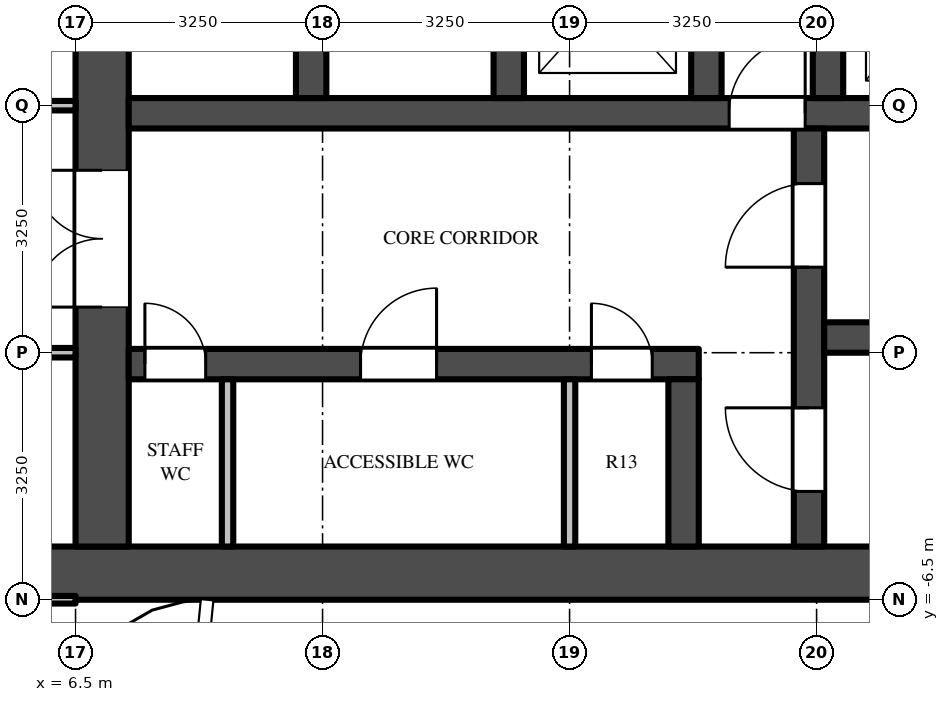
"""IFC4 building model, lengths in metres.
Left out: names, types, materials, properties, quantities, classifications, styles, units other than length and angle.
Written with IfcOpenShell. Run it as: python <this file> out.ifc"""

import sys

from ifc_helpers import new_model, si_unit, direction, frame, frame_2d, origin, place, context, subcontext, project, spatial, rectangle, extrude, source, transform, mapped, element, fill, save


model = new_model("IFC4")
c1 = context("Model", 3, precision=1e-05, world=origin(), true_north=direction((0.0, 1.0)))
c2 = subcontext(c1, "Body", "Model", "MODEL_VIEW")
j1 = project(units=[si_unit("LENGTHUNIT", "METRE"), si_unit("PLANEANGLEUNIT", "RADIAN")], contexts=[c1])
p1 = place(None, origin())
s1 = spatial("IfcSite", under=j1, at=p1, CompositionType="ELEMENT")
p2 = place(p1, origin())
s2 = spatial("IfcBuilding", under=s1, at=p2, CompositionType="ELEMENT")
p3 = place(p2, frame((0.0, 0.0, 255.8)))
s3 = spatial("IfcBuildingStorey", under=s2, at=p3, CompositionType="ELEMENT", Elevation=255.8)
m1 = source(origin(), c2, "Body", "SweptSolid", [
    extrude(rectangle(XDim=16.6, YDim=0.7, at=frame_2d((8.3, 0.0))), origin(), (0.0, 0.0, 1.0), 3.7),
])
p4 = place(p3, frame((6.15, -6.15, 0.0), z_axis=(0.0, 0.0, 1.0), x_axis=(1.0, 0.0, 0.0)))
e1 = element("IfcWall", 1, at=p4, inside=s3, PredefinedType="SHEAR", context=c2, shape_type="MappedRepresentation", body=[
    mapped(m1, transform((0.0, 0.0, 0.0))),
])
m2 = source(origin(), c2, "Body", "SweptSolid", [
    extrude(rectangle(XDim=9.05, YDim=0.7, at=frame_2d((4.525, 0.0))), origin(), (0.0, 0.0, 1.0), 3.7),
])
p5 = place(p3, frame((6.85, -5.8, 0.0), z_axis=(0.0, 0.0, 1.0), x_axis=(0.0, 1.0, 0.0)))
e2 = element("IfcWall", 2, at=p5, inside=s3, PredefinedType="SHEAR", context=c2, shape_type="MappedRepresentation", body=[
    mapped(m2, transform((0.0, 0.0, 0.0))),
])
m3 = source(origin(), c2, "Body", "SweptSolid", [
    extrude(rectangle(XDim=1.8, YDim=2.1, at=frame_2d((0.9, 1.05))), frame((0.0, 0.36, 0.0), z_axis=(0.0, -1.0, 0.0), x_axis=(1.0, 0.0, 0.0)), (0.0, 0.0, 1.0), 0.72),
])
p6 = place(p5, frame((3.15, 0.0, 0.0)))
e3 = element("IfcOpeningElement", 3, at=p6, cuts=e2, PredefinedType="OPENING", context=c2, shape_type="MappedRepresentation", body=[
    mapped(m3, transform((0.0, 0.0, 0.0))),
])
m4 = source(origin(), c2, "Body", "SweptSolid", [
    extrude(rectangle(XDim=7.5, YDim=0.4, at=frame_2d((3.75, 0.0))), origin(), (0.0, 0.0, 1.0), 3.7),
])
p7 = place(p3, frame((7.2, -3.4, 0.0), z_axis=(0.0, 0.0, 1.0), x_axis=(1.0, 0.0, 0.0)))
e4 = element("IfcWall", 4, at=p7, inside=s3, PredefinedType="SHEAR", context=c2, shape_type="MappedRepresentation", body=[
    mapped(m4, transform((0.0, 0.0, 0.0))),
])
m5 = source(origin(), c2, "Body", "SweptSolid", [
    extrude(rectangle(XDim=0.8, YDim=2.1, at=frame_2d((0.4, 1.05))), frame((0.0, 0.21, 0.0), z_axis=(0.0, -1.0, 0.0), x_axis=(1.0, 0.0, 0.0)), (0.0, 0.0, 1.0), 0.42),
])
p8 = place(p7, frame((0.212, 0.0, 0.0)))
e5 = element("IfcOpeningElement", 5, at=p8, cuts=e4, PredefinedType="OPENING", context=c2, shape_type="MappedRepresentation", body=[
    mapped(m5, transform((0.0, 0.0, 0.0))),
])
m6 = source(origin(), c2, "Body", "SweptSolid", [
    extrude(rectangle(XDim=1.0, YDim=2.1, at=frame_2d((0.5, 1.05))), frame((0.0, 0.21, 0.0), z_axis=(0.0, -1.0, 0.0), x_axis=(1.0, 0.0, 0.0)), (0.0, 0.0, 1.0), 0.42),
])
p9 = place(p7, frame((3.05, 0.0, 0.0)))
e6 = element("IfcOpeningElement", 6, at=p9, cuts=e4, PredefinedType="OPENING", context=c2, shape_type="MappedRepresentation", body=[
    mapped(m6, transform((0.0, 0.0, 0.0))),
])
p10 = place(p7, frame((6.087, 0.0, 0.0)))
e7 = element("IfcOpeningElement", 7, at=p10, cuts=e4, PredefinedType="OPENING", context=c2, shape_type="MappedRepresentation", body=[
    mapped(m5, transform((0.0, 0.0, 0.0))),
])
m7 = source(origin(), c2, "Body", "SweptSolid", [
    extrude(rectangle(XDim=14.85, YDim=0.4, at=frame_2d((7.425, 0.0))), origin(), (0.0, 0.0, 1.0), 3.7),
])
p11 = place(p3, frame((7.2, -0.1, 0.0), z_axis=(0.0, 0.0, 1.0), x_axis=(1.0, 0.0, 0.0)))
e8 = element("IfcWall", 8, at=p11, inside=s3, PredefinedType="SHEAR", context=c2, shape_type="MappedRepresentation", body=[
    mapped(m7, transform((0.0, 0.0, 0.0))),
])
p12 = place(p11, frame((7.9, 0.0, 0.0)))
e9 = element("IfcOpeningElement", 9, at=p12, cuts=e8, PredefinedType="OPENING", context=c2, shape_type="MappedRepresentation", body=[
    mapped(m6, transform((0.0, 0.0, 0.0))),
])
m8 = source(origin(), c2, "Body", "SweptSolid", [
    extrude(rectangle(XDim=5.5, YDim=0.4, at=frame_2d((2.75, 0.0))), origin(), (0.0, 0.0, 1.0), 3.7),
])
p13 = place(p3, frame((16.15, -5.8, 0.0), z_axis=(0.0, 0.0, 1.0), x_axis=(0.0, 1.0, 0.0)))
e10 = element("IfcWall", 10, at=p13, inside=s3, PredefinedType="SHEAR", context=c2, shape_type="MappedRepresentation", body=[
    mapped(m8, transform((0.0, 0.0, 0.0))),
])
m9 = source(origin(), c2, "Body", "SweptSolid", [
    extrude(rectangle(XDim=1.1, YDim=2.1, at=frame_2d((0.55, 1.05))), frame((0.0, 0.21, 0.0), z_axis=(0.0, -1.0, 0.0), x_axis=(1.0, 0.0, 0.0)), (0.0, 0.0, 1.0), 0.42),
])
p14 = place(p13, frame((0.725, 0.0, 0.0)))
e11 = element("IfcOpeningElement", 11, at=p14, cuts=e10, PredefinedType="OPENING", context=c2, shape_type="MappedRepresentation", body=[
    mapped(m9, transform((0.0, 0.0, 0.0))),
])
p15 = place(p13, frame((3.675, 0.0, 0.0)))
e12 = element("IfcOpeningElement", 12, at=p15, cuts=e10, PredefinedType="OPENING", context=c2, shape_type="MappedRepresentation", body=[
    mapped(m9, transform((0.0, 0.0, 0.0))),
])
m10 = source(origin(), c2, "Body", "SweptSolid", [
    extrude(rectangle(XDim=5.7, YDim=0.4, at=frame_2d((2.85, 0.0))), origin(), (0.0, 0.0, 1.0), 3.7),
])
p16 = place(p3, frame((16.35, -3.05, 0.0), z_axis=(0.0, 0.0, 1.0), x_axis=(1.0, 0.0, 0.0)))
e13 = element("IfcWall", 13, at=p16, inside=s3, PredefinedType="SHEAR", context=c2, shape_type="MappedRepresentation", body=[
    mapped(m10, transform((0.0, 0.0, 0.0))),
])
m11 = source(origin(), c2, "Body", "SweptSolid", [
    extrude(rectangle(XDim=2.2, YDim=0.4, at=frame_2d((1.1, 0.0))), origin(), (0.0, 0.0, 1.0), 3.7),
])
p17 = place(p3, frame((14.5, -5.8, 0.0), z_axis=(0.0, 0.0, 1.0), x_axis=(0.0, 1.0, 0.0)))
e14 = element("IfcWall", 14, at=p17, inside=s3, PredefinedType="SHEAR", context=c2, shape_type="MappedRepresentation", body=[
    mapped(m11, transform((0.0, 0.0, 0.0))),
])
m12 = source(origin(), c2, "Body", "SweptSolid", [
    extrude(rectangle(XDim=2.45, YDim=0.4, at=frame_2d((1.225, 0.0))), origin(), (0.0, 0.0, 1.0), 3.7),
])
for number, where, z_axis, x_axis in (
    (15, (9.6, 0.1, 0.0), (0.0, 0.0, 1.0), (0.0, 1.0, 0.0)),
    (16, (12.2, 0.1, 0.0), (0.0, 0.0, 1.0), (0.0, 1.0, 0.0)),
    (17, (14.8, 0.1, 0.0), (0.0, 0.0, 1.0), (0.0, 1.0, 0.0)),
    (18, (16.4, 0.1, 0.0), (0.0, 0.0, 1.0), (0.0, 1.0, 0.0)),
):
    element("IfcWall", number, at=place(p3, frame(where, z_axis=z_axis, x_axis=x_axis)), inside=s3, PredefinedType="SHEAR", context=c2, shape_type="MappedRepresentation", body=[
        mapped(m12, transform((0.0, 0.0, 0.0))),
    ])
m13 = source(origin(), c2, "Body", "SweptSolid", [
    extrude(rectangle(XDim=2.2, YDim=0.15, at=frame_2d((1.1, 0.0))), origin(), (0.0, 0.0, 1.0), 3.7),
])
for number, where, z_axis, x_axis in (
    (19, (8.5, -5.8, 0.0), (0.0, 0.0, 1.0), (0.0, 1.0, 0.0)),
    (20, (13.0, -5.8, 0.0), (0.0, 0.0, 1.0), (0.0, 1.0, 0.0)),
):
    element("IfcWall", number, at=place(p3, frame(where, z_axis=z_axis, x_axis=x_axis)), inside=s3, PredefinedType="PARTITIONING", context=c2, shape_type="MappedRepresentation", body=[
        mapped(m13, transform((0.0, 0.0, 0.0))),
    ])
m14 = source(origin(), c2, "Body", "SweptSolid", [
    extrude(rectangle(XDim=5.363, YDim=0.1, at=frame_2d((2.681, 0.0))), origin(), (0.0, 0.0, 1.0), 2.78),
])
p18 = place(p3, frame((1.137, -6.5, 0.0), z_axis=(0.0, 0.0, 1.0), x_axis=(1.0, 0.0, 0.0)))
e21 = element("IfcWall", 21, at=p18, inside=s3, PredefinedType="PARTITIONING", context=c2, shape_type="MappedRepresentation", body=[
    mapped(m14, transform((0.0, 0.0, 0.0))),
])
m15 = source(origin(), c2, "Body", "SweptSolid", [
    extrude(rectangle(XDim=5.363, YDim=0.125, at=frame_2d((2.681, 0.0))), origin(), (0.0, 0.0, 1.0), 2.997),
])
p19 = place(p3, frame((6.5, -3.25, 0.0), z_axis=(0.0, 0.0, 1.0), x_axis=(-1.0, 0.0, 0.0)))
e22 = element("IfcWall", 22, at=p19, inside=s3, PredefinedType="PARTITIONING", context=c2, shape_type="MappedRepresentation", body=[
    mapped(m15, transform((0.0, 0.0, 0.0))),
])
m16 = source(origin(), c2, "Body", "SweptSolid", [
    extrude(rectangle(XDim=1.0, YDim=2.1, at=frame_2d((0.5, 1.05))), frame((0.0, 0.073, 0.0), z_axis=(0.0, -1.0, 0.0), x_axis=(1.0, 0.0, 0.0)), (0.0, 0.0, 1.0), 0.145),
])
p20 = place(p19, frame((0.35, 0.0, 0.0)))
e23 = element("IfcOpeningElement", 23, at=p20, cuts=e22, PredefinedType="OPENING", context=c2, shape_type="MappedRepresentation", body=[
    mapped(m16, transform((0.0, 0.0, 0.0))),
])
p21 = place(p3, frame((6.5, 0.0, 0.0), z_axis=(0.0, 0.0, 1.0), x_axis=(-1.0, 0.0, 0.0)))
e24 = element("IfcWall", 24, at=p21, inside=s3, PredefinedType="PARTITIONING", context=c2, shape_type="MappedRepresentation", body=[
    mapped(m15, transform((0.0, 0.0, 0.0))),
])
p22 = place(p21, frame((3.95, 0.0, 0.0)))
e25 = element("IfcOpeningElement", 25, at=p22, cuts=e24, PredefinedType="OPENING", context=c2, shape_type="MappedRepresentation", body=[
    mapped(m16, transform((0.0, 0.0, 0.0))),
])
m17 = source(origin(), c2, "Body", "SweptSolid", [
    extrude(rectangle(XDim=1.8, YDim=2.1, at=frame_2d((0.9, 1.05))), frame((0.0, -0.275, 0.0), z_axis=(0.0, -1.0, 0.0), x_axis=(1.0, 0.0, 0.0)), (0.0, 0.0, 1.0), 0.05),
])
p23 = place(p6, origin())
e26 = element("IfcDoor", 26, at=p23, inside=s3, OperationType="DOUBLE_DOOR_SINGLE_SWING", PredefinedType="DOOR", context=c2, shape_type="MappedRepresentation", body=[
    mapped(m17, transform((0.0, 0.0, 0.0))),
])
fill(e3, e26)
m18 = source(origin(), c2, "Body", "SweptSolid", [
    extrude(rectangle(XDim=1.1, YDim=2.1, at=frame_2d((0.55, 1.05))), frame((0.0, 0.025, 0.0), z_axis=(0.0, -1.0, 0.0), x_axis=(1.0, 0.0, 0.0)), (0.0, 0.0, 1.0), 0.05),
])
p24 = place(p14, origin())
e27 = element("IfcDoor", 27, at=p24, inside=s3, OperationType="SINGLE_SWING_RIGHT", PredefinedType="DOOR", context=c2, shape_type="MappedRepresentation", body=[
    mapped(m18, transform((0.0, 0.0, 0.0))),
])
fill(e11, e27)
p25 = place(p15, origin())
e28 = element("IfcDoor", 28, at=p25, inside=s3, OperationType="SINGLE_SWING_LEFT", PredefinedType="DOOR", context=c2, shape_type="MappedRepresentation", body=[
    mapped(m18, transform((0.0, 0.0, 0.0))),
])
fill(e12, e28)
m19 = source(origin(), c2, "Body", "SweptSolid", [
    extrude(rectangle(XDim=1.0, YDim=2.1, at=frame_2d((0.5, 1.05))), frame((0.0, 0.025, 0.0), z_axis=(0.0, -1.0, 0.0), x_axis=(1.0, 0.0, 0.0)), (0.0, 0.0, 1.0), 0.05),
])
p26 = place(p12, origin())
e29 = element("IfcDoor", 29, at=p26, inside=s3, OperationType="SINGLE_SWING_RIGHT", PredefinedType="DOOR", context=c2, shape_type="MappedRepresentation", body=[
    mapped(m19, transform((0.0, 0.0, 0.0))),
])
fill(e9, e29)
m20 = source(origin(), c2, "Body", "SweptSolid", [
    extrude(rectangle(XDim=0.8, YDim=2.1, at=frame_2d((0.4, 1.05))), frame((0.0, 0.025, 0.0), z_axis=(0.0, -1.0, 0.0), x_axis=(1.0, 0.0, 0.0)), (0.0, 0.0, 1.0), 0.05),
])
p27 = place(p8, origin())
e30 = element("IfcDoor", 30, at=p27, inside=s3, OperationType="SINGLE_SWING_LEFT", PredefinedType="DOOR", context=c2, shape_type="MappedRepresentation", body=[
    mapped(m20, transform((0.0, 0.0, 0.0))),
])
fill(e5, e30)
p28 = place(p9, origin())
e31 = element("IfcDoor", 31, at=p28, inside=s3, OperationType="SINGLE_SWING_RIGHT", PredefinedType="DOOR", context=c2, shape_type="MappedRepresentation", body=[
    mapped(m19, transform((0.0, 0.0, 0.0))),
])
fill(e6, e31)
p29 = place(p10, origin())
e32 = element("IfcDoor", 32, at=p29, inside=s3, OperationType="SINGLE_SWING_LEFT", PredefinedType="DOOR", context=c2, shape_type="MappedRepresentation", body=[
    mapped(m20, transform((0.0, 0.0, 0.0))),
])
fill(e7, e32)
save(model, sys.argv[1])
